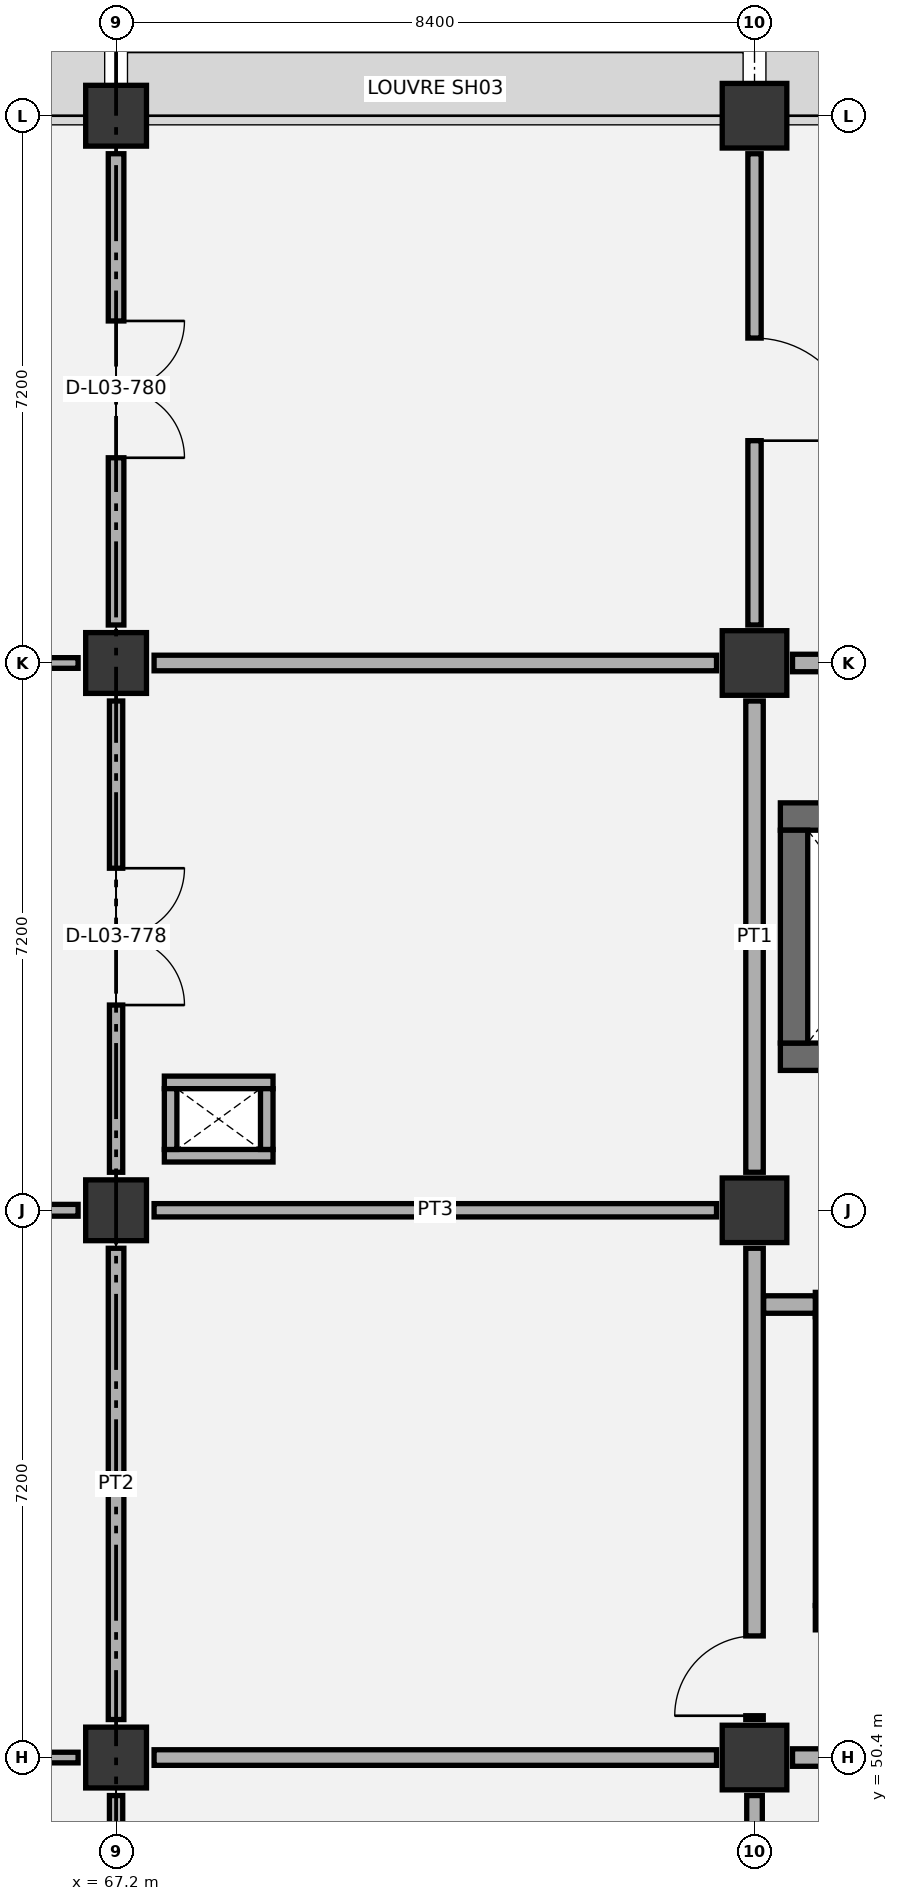
"""IFC4 building model, lengths in metres.
Left out: names, types, materials, properties, quantities, classifications, styles, units other than length and angle.
Written with IfcOpenShell. Run it as: python <this file> out.ifc"""

import sys

from ifc_helpers import new_model, si_unit, direction, frame, frame_2d, origin, origin_2d, place, context, subcontext, project, spatial, rectangle, extrude, element, fill, save


model = new_model("IFC4")
c1 = context("Model", 3, precision=1e-05, world=origin(), true_north=direction((0.0, 1.0)))
c2 = subcontext(c1, "Body", "Model", "MODEL_VIEW")
j1 = project(units=[si_unit("LENGTHUNIT", "METRE"), si_unit("PLANEANGLEUNIT", "RADIAN")], contexts=[c1])
p1 = place(None, origin())
s1 = spatial("IfcSite", under=j1, at=p1, CompositionType="ELEMENT")
p2 = place(p1, origin())
s2 = spatial("IfcBuilding", under=s1, at=p2, CompositionType="ELEMENT")
p3 = place(p2, frame((0.0, 0.0, 16.8)))
s3 = spatial("IfcBuildingStorey", under=s2, at=p3, CompositionType="ELEMENT", Elevation=16.8)
for number, where, z_axis, x_axis in (
    (1, (67.2, 50.4, 0.0), (0.0, 0.0, 1.0), (1.0, 0.0, 0.0)),
    (2, (67.2, 57.6, 0.0), (0.0, 0.0, 1.0), (1.0, 0.0, 0.0)),
    (3, (67.2, 64.8, 0.0), (0.0, 0.0, 1.0), (1.0, 0.0, 0.0)),
    (4, (67.2, 72.0, 0.0), (0.0, 0.0, 1.0), (1.0, 0.0, 0.0)),
):
    element("IfcColumn", number, at=place(p3, frame(where, z_axis=z_axis, x_axis=x_axis)), inside=s3, PredefinedType="COLUMN", context=c2, shape_type="SweptSolid", body=[
        extrude(rectangle(XDim=0.8, YDim=0.8, at=origin_2d()), origin(), (0.0, 0.0, 1.0), 5.4),
    ])
for number, where, z_axis, x_axis in (
    (5, (75.6, 50.4, 0.0), (0.0, 0.0, 1.0), (1.0, 0.0, 0.0)),
    (6, (75.6, 57.6, 0.0), (0.0, 0.0, 1.0), (1.0, 0.0, 0.0)),
    (7, (75.6, 64.8, 0.0), (0.0, 0.0, 1.0), (1.0, 0.0, 0.0)),
    (8, (75.6, 72.0, 0.0), (0.0, 0.0, 1.0), (1.0, 0.0, 0.0)),
):
    element("IfcColumn", number, at=place(p3, frame(where, z_axis=z_axis, x_axis=x_axis)), inside=s3, PredefinedType="COLUMN", context=c2, shape_type="SweptSolid", body=[
        extrude(rectangle(XDim=0.85, YDim=0.85, at=origin_2d()), origin(), (0.0, 0.0, 1.0), 5.4),
    ])
p4 = place(p3, frame((76.4, 52.24, 0.0), z_axis=(0.0, 0.0, 1.0), x_axis=(1.0, 0.0, 0.0)))
e9 = element("IfcWall", 9, at=p4, inside=s3, PredefinedType="SHEAR", context=c2, shape_type="SweptSolid", body=[
    extrude(rectangle(XDim=7.48, YDim=0.32, at=frame_2d((3.74, 0.0))), origin(), (0.0, 0.0, 1.0), 4.95),
])
p5 = place(p4, frame((0.45, 0.0, 0.0)))
e10 = element("IfcOpeningElement", 10, at=p5, cuts=e9, PredefinedType="OPENING", context=c2, shape_type="SweptSolid", body=[
    extrude(rectangle(XDim=1.05, YDim=2.15, at=frame_2d((0.525, 1.075))), frame((0.0, 0.17, 0.0), z_axis=(0.0, -1.0, 0.0), x_axis=(1.0, 0.0, 0.0)), (0.0, 0.0, 1.0), 0.34),
])
p6 = place(p3, frame((76.4, 56.36, 0.0), z_axis=(0.0, 0.0, 1.0), x_axis=(1.0, 0.0, 0.0)))
e11 = element("IfcWall", 11, at=p6, inside=s3, PredefinedType="SHEAR", context=c2, shape_type="SweptSolid", body=[
    extrude(rectangle(XDim=7.48, YDim=0.32, at=frame_2d((3.74, 0.0))), origin(), (0.0, 0.0, 1.0), 4.95),
])
p7 = place(p3, frame((76.56, 52.4, 0.0), z_axis=(0.0, 0.0, 1.0), x_axis=(0.0, 1.0, 0.0)))
e12 = element("IfcWall", 12, at=p7, inside=s3, PredefinedType="SHEAR", context=c2, shape_type="SweptSolid", body=[
    extrude(rectangle(XDim=3.8, YDim=0.32, at=frame_2d((1.9, 0.0))), origin(), (0.0, 0.0, 1.0), 4.95),
])
p8 = place(p3, frame((75.94, 62.78, 0.0), z_axis=(0.0, 0.0, 1.0), x_axis=(1.0, 0.0, 0.0)))
e13 = element("IfcWall", 13, at=p8, inside=s3, PredefinedType="SHEAR", context=c2, shape_type="SweptSolid", body=[
    extrude(rectangle(XDim=2.87, YDim=0.36, at=frame_2d((1.435, 0.0))), origin(), (0.0, 0.0, 1.0), 4.95),
])
p9 = place(p3, frame((75.94, 59.62, 0.0), z_axis=(0.0, 0.0, 1.0), x_axis=(1.0, 0.0, 0.0)))
e14 = element("IfcWall", 14, at=p9, inside=s3, PredefinedType="SHEAR", context=c2, shape_type="SweptSolid", body=[
    extrude(rectangle(XDim=2.87, YDim=0.36, at=frame_2d((1.435, 0.0))), origin(), (0.0, 0.0, 1.0), 4.95),
])
p10 = place(p9, frame((0.76, 0.0, 0.0)))
e15 = element("IfcOpeningElement", 15, at=p10, cuts=e14, PredefinedType="OPENING", context=c2, shape_type="SweptSolid", body=[
    extrude(rectangle(XDim=1.35, YDim=2.2, at=frame_2d((0.675, 1.1))), frame((0.0, 0.19, 0.0), z_axis=(0.0, -1.0, 0.0), x_axis=(1.0, 0.0, 0.0)), (0.0, 0.0, 1.0), 0.38),
])
p11 = place(p3, frame((76.12, 59.8, 0.0), z_axis=(0.0, 0.0, 1.0), x_axis=(0.0, 1.0, 0.0)))
e16 = element("IfcWall", 16, at=p11, inside=s3, PredefinedType="SHEAR", context=c2, shape_type="SweptSolid", body=[
    extrude(rectangle(XDim=2.8, YDim=0.36, at=frame_2d((1.4, 0.0))), origin(), (0.0, 0.0, 1.0), 4.95),
])
for number, where, z_axis, x_axis in (
    (17, (67.835, 58.317, 0.0), (0.0, 0.0, 1.0), (1.0, 0.0, 0.0)),
    (18, (67.835, 59.282, 0.0), (0.0, 0.0, 1.0), (1.0, 0.0, 0.0)),
):
    element("IfcWall", number, at=place(p3, frame(where, z_axis=z_axis, x_axis=x_axis)), inside=s3, PredefinedType="PARTITIONING", context=c2, shape_type="SweptSolid", body=[
        extrude(rectangle(XDim=1.43, YDim=0.165, at=frame_2d((0.715, 0.0))), origin(), (0.0, 0.0, 1.0), 4.825),
    ])
for number, where, z_axis, x_axis in (
    (19, (67.917, 58.4, 0.0), (0.0, 0.0, 1.0), (0.0, 1.0, 0.0)),
    (20, (69.183, 58.4, 0.0), (0.0, 0.0, 1.0), (0.0, 1.0, 0.0)),
):
    element("IfcWall", number, at=place(p3, frame(where, z_axis=z_axis, x_axis=x_axis)), inside=s3, PredefinedType="PARTITIONING", context=c2, shape_type="SweptSolid", body=[
        extrude(rectangle(XDim=0.8, YDim=0.165, at=frame_2d((0.4, 0.0))), origin(), (0.0, 0.0, 1.0), 4.825),
    ])
p12 = place(p3, frame((67.2, 43.7, 0.0), z_axis=(0.0, 0.0, 1.0), x_axis=(0.0, 1.0, 0.0)))
e21 = element("IfcWall", 21, at=p12, inside=s3, PredefinedType="PARTITIONING", context=c2, shape_type="SweptSolid", body=[
    extrude(rectangle(XDim=6.2, YDim=0.175, at=frame_2d((3.1, 0.0))), origin(), (0.0, 0.0, 1.0), 4.12),
])
p13 = place(p12, frame((2.3, 0.0, 0.0)))
e22 = element("IfcOpeningElement", 22, at=p13, cuts=e21, PredefinedType="OPENING", context=c2, shape_type="SweptSolid", body=[
    extrude(rectangle(XDim=1.6, YDim=2.2, at=frame_2d((0.8, 1.1))), frame((0.0, 0.097, 0.0), z_axis=(0.0, -1.0, 0.0), x_axis=(1.0, 0.0, 0.0)), (0.0, 0.0, 1.0), 0.195),
])
p14 = place(p3, frame((59.3, 50.4, 0.0), z_axis=(0.0, 0.0, 1.0), x_axis=(1.0, 0.0, 0.0)))
e23 = element("IfcWall", 23, at=p14, inside=s3, PredefinedType="PARTITIONING", context=c2, shape_type="SweptSolid", body=[
    extrude(rectangle(XDim=7.4, YDim=0.14, at=frame_2d((3.7, 0.0))), origin(), (0.0, 0.0, 1.0), 4.07),
])
p15 = place(p14, frame((2.8, 0.0, 0.0)))
e24 = element("IfcOpeningElement", 24, at=p15, cuts=e23, PredefinedType="OPENING", context=c2, shape_type="SweptSolid", body=[
    extrude(rectangle(XDim=1.8, YDim=2.25, at=frame_2d((0.9, 1.125))), frame((0.0, 0.08, 0.0), z_axis=(0.0, -1.0, 0.0), x_axis=(1.0, 0.0, 0.0)), (0.0, 0.0, 1.0), 0.16),
])
p16 = place(p3, frame((67.2, 50.9, 0.0), z_axis=(0.0, 0.0, 1.0), x_axis=(0.0, 1.0, 0.0)))
e25 = element("IfcWall", 25, at=p16, inside=s3, PredefinedType="PARTITIONING", context=c2, shape_type="SweptSolid", body=[
    extrude(rectangle(XDim=6.2, YDim=0.205, at=frame_2d((3.1, 0.0))), origin(), (0.0, 0.0, 1.0), 4.42),
])
p17 = place(p3, frame((59.3, 57.6, 0.0), z_axis=(0.0, 0.0, 1.0), x_axis=(1.0, 0.0, 0.0)))
e26 = element("IfcWall", 26, at=p17, inside=s3, PredefinedType="PARTITIONING", context=c2, shape_type="SweptSolid", body=[
    extrude(rectangle(XDim=7.4, YDim=0.155, at=frame_2d((3.7, 0.0))), origin(), (0.0, 0.0, 1.0), 4.07),
])
p18 = place(p17, frame((2.9, 0.0, 0.0)))
e27 = element("IfcOpeningElement", 27, at=p18, cuts=e26, PredefinedType="OPENING", context=c2, shape_type="SweptSolid", body=[
    extrude(rectangle(XDim=1.6, YDim=2.2, at=frame_2d((0.8, 1.1))), frame((0.0, 0.087, 0.0), z_axis=(0.0, -1.0, 0.0), x_axis=(1.0, 0.0, 0.0)), (0.0, 0.0, 1.0), 0.175),
])
p19 = place(p3, frame((67.2, 58.1, 0.0), z_axis=(0.0, 0.0, 1.0), x_axis=(0.0, 1.0, 0.0)))
e28 = element("IfcWall", 28, at=p19, inside=s3, PredefinedType="PARTITIONING", context=c2, shape_type="SweptSolid", body=[
    extrude(rectangle(XDim=6.2, YDim=0.175, at=frame_2d((3.1, 0.0))), origin(), (0.0, 0.0, 1.0), 4.12),
])
p20 = place(p19, frame((2.2, 0.0, 0.0)))
e29 = element("IfcOpeningElement", 29, at=p20, cuts=e28, PredefinedType="OPENING", context=c2, shape_type="SweptSolid", body=[
    extrude(rectangle(XDim=1.8, YDim=2.25, at=frame_2d((0.9, 1.125))), frame((0.0, 0.097, 0.0), z_axis=(0.0, -1.0, 0.0), x_axis=(1.0, 0.0, 0.0)), (0.0, 0.0, 1.0), 0.195),
])
p21 = place(p3, frame((59.3, 64.8, 0.0), z_axis=(0.0, 0.0, 1.0), x_axis=(1.0, 0.0, 0.0)))
e30 = element("IfcWall", 30, at=p21, inside=s3, PredefinedType="PARTITIONING", context=c2, shape_type="SweptSolid", body=[
    extrude(rectangle(XDim=7.4, YDim=0.14, at=frame_2d((3.7, 0.0))), origin(), (0.0, 0.0, 1.0), 4.07),
])
p22 = place(p21, frame((2.9, 0.0, 0.0)))
e31 = element("IfcOpeningElement", 31, at=p22, cuts=e30, PredefinedType="OPENING", context=c2, shape_type="SweptSolid", body=[
    extrude(rectangle(XDim=1.6, YDim=2.2, at=frame_2d((0.8, 1.1))), frame((0.0, 0.08, 0.0), z_axis=(0.0, -1.0, 0.0), x_axis=(1.0, 0.0, 0.0)), (0.0, 0.0, 1.0), 0.16),
])
p23 = place(p3, frame((67.2, 65.3, 0.0), z_axis=(0.0, 0.0, 1.0), x_axis=(0.0, 1.0, 0.0)))
e32 = element("IfcWall", 32, at=p23, inside=s3, PredefinedType="PARTITIONING", context=c2, shape_type="SweptSolid", body=[
    extrude(rectangle(XDim=6.2, YDim=0.205, at=frame_2d((3.1, 0.0))), origin(), (0.0, 0.0, 1.0), 4.53),
])
p24 = place(p23, frame((2.2, 0.0, 0.0)))
e33 = element("IfcOpeningElement", 33, at=p24, cuts=e32, PredefinedType="OPENING", context=c2, shape_type="SweptSolid", body=[
    extrude(rectangle(XDim=1.8, YDim=2.25, at=frame_2d((0.9, 1.125))), frame((0.0, 0.113, 0.0), z_axis=(0.0, -1.0, 0.0), x_axis=(1.0, 0.0, 0.0)), (0.0, 0.0, 1.0), 0.225),
])
p25 = place(p3, frame((75.6, 43.7, 0.0), z_axis=(0.0, 0.0, 1.0), x_axis=(0.0, 1.0, 0.0)))
e34 = element("IfcWall", 34, at=p25, inside=s3, PredefinedType="PARTITIONING", context=c2, shape_type="SweptSolid", body=[
    extrude(rectangle(XDim=6.2, YDim=0.205, at=frame_2d((3.1, 0.0))), origin(), (0.0, 0.0, 1.0), 4.545),
])
p26 = place(p25, frame((2.45, 0.0, 0.0)))
e35 = element("IfcOpeningElement", 35, at=p26, cuts=e34, PredefinedType="OPENING", context=c2, shape_type="SweptSolid", body=[
    extrude(rectangle(XDim=1.3, YDim=2.15, at=frame_2d((0.65, 1.075))), frame((0.0, 0.113, 0.0), z_axis=(0.0, -1.0, 0.0), x_axis=(1.0, 0.0, 0.0)), (0.0, 0.0, 1.0), 0.225),
])
p27 = place(p3, frame((67.7, 50.4, 0.0), z_axis=(0.0, 0.0, 1.0), x_axis=(1.0, 0.0, 0.0)))
e36 = element("IfcWall", 36, at=p27, inside=s3, PredefinedType="PARTITIONING", context=c2, shape_type="SweptSolid", body=[
    extrude(rectangle(XDim=7.4, YDim=0.205, at=frame_2d((3.7, 0.0))), origin(), (0.0, 0.0, 1.0), 4.195),
])
p28 = place(p3, frame((75.6, 50.9, 0.0), z_axis=(0.0, 0.0, 1.0), x_axis=(0.0, 1.0, 0.0)))
e37 = element("IfcWall", 37, at=p28, inside=s3, PredefinedType="PARTITIONING", context=c2, shape_type="SweptSolid", body=[
    extrude(rectangle(XDim=6.2, YDim=0.23, at=frame_2d((3.1, 0.0))), origin(), (0.0, 0.0, 1.0), 4.245),
])
p29 = place(p28, frame((0.05, 0.0, 0.0)))
e38 = element("IfcOpeningElement", 38, at=p29, cuts=e37, PredefinedType="OPENING", context=c2, shape_type="SweptSolid", body=[
    extrude(rectangle(XDim=1.05, YDim=2.15, at=frame_2d((0.525, 1.075))), frame((0.0, 0.125, 0.0), z_axis=(0.0, -1.0, 0.0), x_axis=(1.0, 0.0, 0.0)), (0.0, 0.0, 1.0), 0.25),
])
p30 = place(p3, frame((67.7, 57.6, 0.0), z_axis=(0.0, 0.0, 1.0), x_axis=(1.0, 0.0, 0.0)))
e39 = element("IfcWall", 39, at=p30, inside=s3, PredefinedType="PARTITIONING", context=c2, shape_type="SweptSolid", body=[
    extrude(rectangle(XDim=7.4, YDim=0.175, at=frame_2d((3.7, 0.0))), origin(), (0.0, 0.0, 1.0), 4.195),
])
p31 = place(p3, frame((75.6, 58.1, 0.0), z_axis=(0.0, 0.0, 1.0), x_axis=(0.0, 1.0, 0.0)))
e40 = element("IfcWall", 40, at=p31, inside=s3, PredefinedType="PARTITIONING", context=c2, shape_type="SweptSolid", body=[
    extrude(rectangle(XDim=6.2, YDim=0.23, at=frame_2d((3.1, 0.0))), origin(), (0.0, 0.0, 1.0), 4.655),
])
p32 = place(p3, frame((67.7, 64.8, 0.0), z_axis=(0.0, 0.0, 1.0), x_axis=(1.0, 0.0, 0.0)))
e41 = element("IfcWall", 41, at=p32, inside=s3, PredefinedType="PARTITIONING", context=c2, shape_type="SweptSolid", body=[
    extrude(rectangle(XDim=7.4, YDim=0.205, at=frame_2d((3.7, 0.0))), origin(), (0.0, 0.0, 1.0), 4.195),
])
p33 = place(p3, frame((75.6, 65.3, 0.0), z_axis=(0.0, 0.0, 1.0), x_axis=(0.0, 1.0, 0.0)))
e42 = element("IfcWall", 42, at=p33, inside=s3, PredefinedType="PARTITIONING", context=c2, shape_type="SweptSolid", body=[
    extrude(rectangle(XDim=6.2, YDim=0.175, at=frame_2d((3.1, 0.0))), origin(), (0.0, 0.0, 1.0), 4.245),
])
p34 = place(p33, frame((2.425, 0.0, 0.0)))
e43 = element("IfcOpeningElement", 43, at=p34, cuts=e42, PredefinedType="OPENING", context=c2, shape_type="SweptSolid", body=[
    extrude(rectangle(XDim=1.35, YDim=2.15, at=frame_2d((0.675, 1.075))), frame((0.0, 0.097, 0.0), z_axis=(0.0, -1.0, 0.0), x_axis=(1.0, 0.0, 0.0)), (0.0, 0.0, 1.0), 0.195),
])
p35 = place(p3, frame((76.1, 50.4, 0.0), z_axis=(0.0, 0.0, 1.0), x_axis=(1.0, 0.0, 0.0)))
e44 = element("IfcWall", 44, at=p35, inside=s3, PredefinedType="PARTITIONING", context=c2, shape_type="SweptSolid", body=[
    extrude(rectangle(XDim=7.4, YDim=0.23, at=frame_2d((3.7, 0.0))), origin(), (0.0, 0.0, 1.0), 4.195),
])
p36 = place(p35, frame((2.95, 0.0, 0.0)))
e45 = element("IfcOpeningElement", 45, at=p36, cuts=e44, PredefinedType="OPENING", context=c2, shape_type="SweptSolid", body=[
    extrude(rectangle(XDim=1.5, YDim=2.15, at=frame_2d((0.75, 1.075))), frame((0.0, 0.125, 0.0), z_axis=(0.0, -1.0, 0.0), x_axis=(1.0, 0.0, 0.0)), (0.0, 0.0, 1.0), 0.25),
])
p37 = place(p3, frame((75.72, 56.36, 0.0), z_axis=(0.0, 0.0, 1.0), x_axis=(1.0, 0.0, 0.0)))
e46 = element("IfcWall", 46, at=p37, inside=s3, PredefinedType="PARTITIONING", context=c2, shape_type="SweptSolid", body=[
    extrude(rectangle(XDim=0.68, YDim=0.23, at=frame_2d((0.34, 0.0))), origin(), (0.0, 0.0, 1.0), 4.95),
])
p38 = place(p3, frame((76.1, 64.8, 0.0), z_axis=(0.0, 0.0, 1.0), x_axis=(1.0, 0.0, 0.0)))
e47 = element("IfcWall", 47, at=p38, inside=s3, PredefinedType="PARTITIONING", context=c2, shape_type="SweptSolid", body=[
    extrude(rectangle(XDim=7.4, YDim=0.23, at=frame_2d((3.7, 0.0))), origin(), (0.0, 0.0, 1.0), 4.195),
])
p39 = place(p20, frame((1.8, 0.0, 0.0), z_axis=(0.0, 0.0, 1.0), x_axis=(-1.0, 0.0, 0.0)))
e48 = element("IfcDoor", 48, at=p39, inside=s3, OperationType="DOUBLE_DOOR_SINGLE_SWING", PredefinedType="DOOR", context=c2, shape_type="SweptSolid", body=[
    extrude(rectangle(XDim=1.8, YDim=2.25, at=frame_2d((0.9, 1.125))), frame((0.0, 0.025, 0.0), z_axis=(0.0, -1.0, 0.0), x_axis=(1.0, 0.0, 0.0)), (0.0, 0.0, 1.0), 0.05),
])
fill(e29, e48)
p40 = place(p24, frame((1.8, 0.0, 0.0), z_axis=(0.0, 0.0, 1.0), x_axis=(-1.0, 0.0, 0.0)))
e49 = element("IfcDoor", 49, at=p40, inside=s3, OperationType="DOUBLE_DOOR_SINGLE_SWING", PredefinedType="DOOR", context=c2, shape_type="SweptSolid", body=[
    extrude(rectangle(XDim=1.8, YDim=2.25, at=frame_2d((0.9, 1.125))), frame((0.0, 0.025, 0.0), z_axis=(0.0, -1.0, 0.0), x_axis=(1.0, 0.0, 0.0)), (0.0, 0.0, 1.0), 0.05),
])
fill(e33, e49)
p41 = place(p29, origin())
e50 = element("IfcDoor", 50, at=p41, inside=s3, OperationType="SINGLE_SWING_LEFT", PredefinedType="DOOR", context=c2, shape_type="SweptSolid", body=[
    extrude(rectangle(XDim=1.05, YDim=2.15, at=frame_2d((0.525, 1.075))), frame((0.0, 0.025, 0.0), z_axis=(0.0, -1.0, 0.0), x_axis=(1.0, 0.0, 0.0)), (0.0, 0.0, 1.0), 0.05),
])
fill(e38, e50)
p42 = place(p34, frame((1.35, 0.0, 0.0), z_axis=(0.0, 0.0, 1.0), x_axis=(-1.0, 0.0, 0.0)))
e51 = element("IfcDoor", 51, at=p42, inside=s3, OperationType="SINGLE_SWING_RIGHT", PredefinedType="DOOR", context=c2, shape_type="SweptSolid", body=[
    extrude(rectangle(XDim=1.35, YDim=2.15, at=frame_2d((0.675, 1.075))), frame((0.0, 0.025, 0.0), z_axis=(0.0, -1.0, 0.0), x_axis=(1.0, 0.0, 0.0)), (0.0, 0.0, 1.0), 0.05),
])
fill(e43, e51)
save(model, sys.argv[1])
